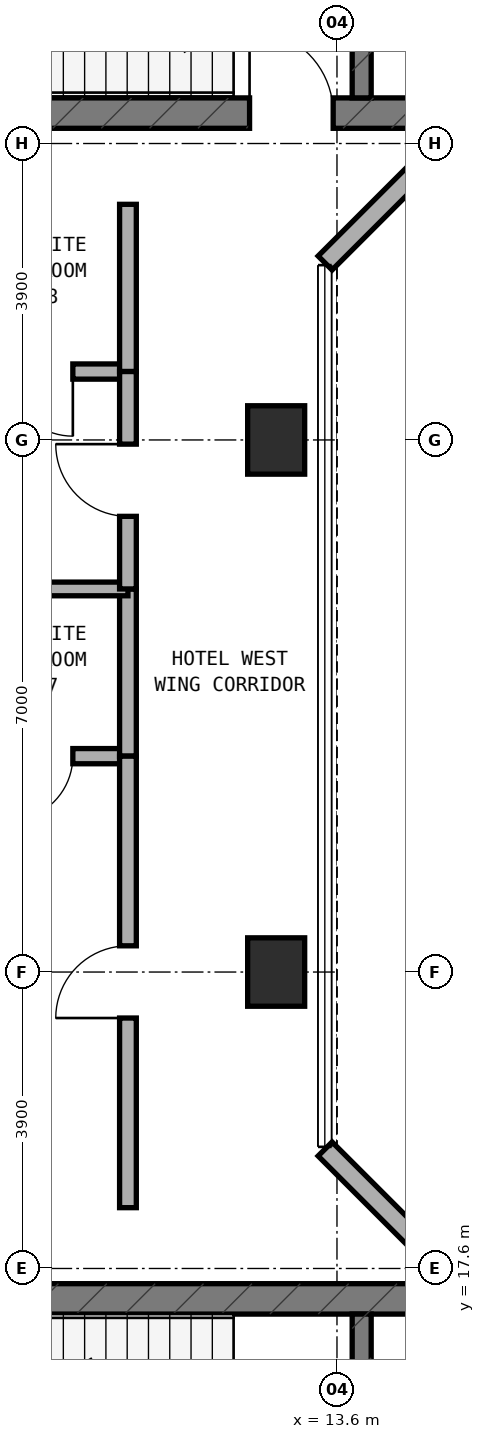
"""IFC4 building model, lengths in metres.
Left out: names, types, materials, properties, quantities, classifications, styles, units other than length and angle.
Written with IfcOpenShell. Run it as: python <this file> out.ifc"""

import sys

from ifc_helpers import new_model, si_unit, direction, frame, frame_2d, origin, origin_2d, place, context, subcontext, project, spatial, rectangle, extrude, element, fill, save


model = new_model("IFC4")
c1 = context("Model", 3, precision=1e-05, world=origin(), true_north=direction((0.0, 1.0)))
c2 = subcontext(c1, "Body", "Model", "MODEL_VIEW")
j1 = project(units=[si_unit("LENGTHUNIT", "METRE"), si_unit("PLANEANGLEUNIT", "RADIAN")], contexts=[c1])
p1 = place(None, origin())
s1 = spatial("IfcSite", under=j1, at=p1, CompositionType="ELEMENT")
p2 = place(p1, origin())
s2 = spatial("IfcBuilding", under=s1, at=p2, CompositionType="ELEMENT")
p3 = place(p2, frame((0.0, 0.0, 145.0)))
s3 = spatial("IfcBuildingStorey", under=s2, at=p3, CompositionType="ELEMENT", Elevation=145.0)
p4 = place(p3, frame((6.4, 32.8, 0.0), z_axis=(0.0, 0.0, 1.0), x_axis=(1.0, 0.0, 0.0)))
e1 = element("IfcWall", 1, at=p4, inside=s3, PredefinedType="SHEAR", context=c2, shape_type="SweptSolid", body=[
    extrude(rectangle(XDim=24.4, YDim=0.4, at=frame_2d((12.2, 0.0))), origin(), (0.0, 0.0, 1.0), 3.5),
])
p5 = place(p4, frame((6.05, 0.0, 0.0)))
e2 = element("IfcOpeningElement", 2, at=p5, cuts=e1, PredefinedType="OPENING", context=c2, shape_type="SweptSolid", body=[
    extrude(rectangle(XDim=1.1, YDim=2.15, at=frame_2d((0.55, 1.075))), frame((0.0, 0.21, 0.0), z_axis=(0.0, -1.0, 0.0), x_axis=(1.0, 0.0, 0.0)), (0.0, 0.0, 1.0), 0.42),
])
p6 = place(p3, frame((13.925, 33.0, 0.0), z_axis=(0.0, 0.0, 1.0), x_axis=(0.0, 1.0, 0.0)))
e3 = element("IfcWall", 3, at=p6, inside=s3, PredefinedType="STANDARD", context=c2, shape_type="SweptSolid", body=[
    extrude(rectangle(XDim=3.16, YDim=0.25, at=frame_2d((1.58, 0.0))), origin(), (0.0, 0.0, 1.0), 3.22),
])
p7 = place(p6, frame((0.98, 0.0, 0.0)))
e4 = element("IfcOpeningElement", 4, at=p7, cuts=e3, PredefinedType="OPENING", context=c2, shape_type="SweptSolid", body=[
    extrude(rectangle(XDim=1.1, YDim=2.15, at=frame_2d((0.55, 1.075))), frame((0.0, 0.135, 0.0), z_axis=(0.0, -1.0, 0.0), x_axis=(1.0, 0.0, 0.0)), (0.0, 0.0, 1.0), 0.27),
])
p8 = place(p3, frame((6.4, 17.2, 0.0), z_axis=(0.0, 0.0, 1.0), x_axis=(1.0, 0.0, 0.0)))
e5 = element("IfcWall", 5, at=p8, inside=s3, PredefinedType="SHEAR", context=c2, shape_type="SweptSolid", body=[
    extrude(rectangle(XDim=24.4, YDim=0.4, at=frame_2d((12.2, 0.0))), origin(), (0.0, 0.0, 1.0), 3.5),
])
p9 = place(p3, frame((13.925, 13.84, 0.0), z_axis=(0.0, 0.0, 1.0), x_axis=(0.0, 1.0, 0.0)))
e6 = element("IfcWall", 6, at=p9, inside=s3, PredefinedType="STANDARD", context=c2, shape_type="SweptSolid", body=[
    extrude(rectangle(XDim=3.16, YDim=0.25, at=frame_2d((1.58, 0.0))), origin(), (0.0, 0.0, 1.0), 3.22),
])
p10 = place(p9, frame((0.98, 0.0, 0.0)))
e7 = element("IfcOpeningElement", 7, at=p10, cuts=e6, PredefinedType="OPENING", context=c2, shape_type="SweptSolid", body=[
    extrude(rectangle(XDim=1.1, YDim=2.15, at=frame_2d((0.55, 1.075))), frame((0.0, 0.135, 0.0), z_axis=(0.0, -1.0, 0.0), x_axis=(1.0, 0.0, 0.0)), (0.0, 0.0, 1.0), 0.27),
])
for number, where, z_axis, x_axis in (
    (8, (12.8, 21.5, 0.0), (0.0, 0.0, 1.0), (1.0, 0.0, 0.0)),
    (9, (12.8, 28.5, 0.0), (0.0, 0.0, 1.0), (1.0, 0.0, 0.0)),
):
    element("IfcColumn", number, at=place(p3, frame(where, z_axis=z_axis, x_axis=x_axis)), inside=s3, PredefinedType="COLUMN", context=c2, shape_type="SweptSolid", body=[
        extrude(rectangle(XDim=0.75, YDim=0.9, at=origin_2d()), origin(), (0.0, 0.0, 1.0), 3.5),
    ])
for number, where, z_axis, x_axis in (
    (10, (15.278, 32.662, 0.0), (0.0, 0.0, 1.0), (-0.707, -0.707, 0.0)),
    (11, (13.444, 19.172, 0.0), (0.0, 0.0, 1.0), (0.707, -0.707, 0.0)),
):
    element("IfcWall", number, at=place(p3, frame(where, z_axis=z_axis, x_axis=x_axis)), inside=s3, PredefinedType="STANDARD", context=c2, shape_type="SweptSolid", body=[
        extrude(rectangle(XDim=2.594, YDim=0.26, at=frame_2d((1.297, 0.0))), origin(), (0.0, 0.0, 1.0), 3.22),
    ])
p11 = place(p3, frame((8.65, 24.34, 0.0), z_axis=(0.0, 0.0, 1.0), x_axis=(1.0, 0.0, 0.0)))
e12 = element("IfcWall", 12, at=p11, inside=s3, PredefinedType="PLUMBINGWALL", context=c2, shape_type="SweptSolid", body=[
    extrude(rectangle(XDim=2.1, YDim=0.2, at=frame_2d((1.05, 0.0))), origin(), (0.0, 0.0, 1.0), 3.22),
])
p12 = place(p11, frame((0.625, 0.0, 0.0)))
e13 = element("IfcOpeningElement", 13, at=p12, cuts=e12, PredefinedType="OPENING", context=c2, shape_type="SweptSolid", body=[
    extrude(rectangle(XDim=0.85, YDim=2.1, at=frame_2d((0.425, 1.05))), frame((0.0, 0.11, 0.0), z_axis=(0.0, -1.0, 0.0), x_axis=(1.0, 0.0, 0.0)), (0.0, 0.0, 1.0), 0.22),
])
p13 = place(p3, frame((10.85, 24.34, 0.0), z_axis=(0.0, 0.0, 1.0), x_axis=(0.0, 1.0, 0.0)))
e14 = element("IfcWall", 14, at=p13, inside=s3, PredefinedType="SOLIDWALL", context=c2, shape_type="SweptSolid", body=[
    extrude(rectangle(XDim=2.2, YDim=0.22, at=frame_2d((1.1, 0.0))), origin(), (0.0, 0.0, 1.0), 3.22),
])
p14 = place(p3, frame((10.85, 18.4, 0.0), z_axis=(0.0, 0.0, 1.0), x_axis=(0.0, 1.0, 0.0)))
e15 = element("IfcWall", 15, at=p14, inside=s3, PredefinedType="SOLIDWALL", context=c2, shape_type="SweptSolid", body=[
    extrude(rectangle(XDim=5.94, YDim=0.22, at=frame_2d((2.97, 0.0))), origin(), (0.0, 0.0, 1.0), 2.795),
])
p15 = place(p14, frame((2.495, 0.0, 0.0)))
e16 = element("IfcOpeningElement", 16, at=p15, cuts=e15, PredefinedType="OPENING", context=c2, shape_type="SweptSolid", body=[
    extrude(rectangle(XDim=0.95, YDim=2.1, at=frame_2d((0.475, 1.05))), frame((0.0, 0.12, 0.0), z_axis=(0.0, -1.0, 0.0), x_axis=(1.0, 0.0, 0.0)), (0.0, 0.0, 1.0), 0.24),
])
p16 = place(p3, frame((0.86, 26.54, 0.0), z_axis=(0.0, 0.0, 1.0), x_axis=(1.0, 0.0, 0.0)))
e17 = element("IfcWall", 17, at=p16, inside=s3, PredefinedType="SOLIDWALL", context=c2, shape_type="SweptSolid", body=[
    extrude(rectangle(XDim=9.99, YDim=0.18, at=frame_2d((4.995, 0.0))), origin(), (0.0, 0.0, 1.0), 2.835),
])
p17 = place(p3, frame((8.65, 29.4, 0.0), z_axis=(0.0, 0.0, 1.0), x_axis=(1.0, 0.0, 0.0)))
e18 = element("IfcWall", 18, at=p17, inside=s3, PredefinedType="PLUMBINGWALL", context=c2, shape_type="SweptSolid", body=[
    extrude(rectangle(XDim=2.1, YDim=0.2, at=frame_2d((1.05, 0.0))), origin(), (0.0, 0.0, 1.0), 3.22),
])
p18 = place(p17, frame((0.625, 0.0, 0.0)))
e19 = element("IfcOpeningElement", 19, at=p18, cuts=e18, PredefinedType="OPENING", context=c2, shape_type="SweptSolid", body=[
    extrude(rectangle(XDim=0.85, YDim=2.1, at=frame_2d((0.425, 1.05))), frame((0.0, 0.11, 0.0), z_axis=(0.0, -1.0, 0.0), x_axis=(1.0, 0.0, 0.0)), (0.0, 0.0, 1.0), 0.22),
])
p19 = place(p3, frame((10.85, 29.4, 0.0), z_axis=(0.0, 0.0, 1.0), x_axis=(0.0, 1.0, 0.0)))
e20 = element("IfcWall", 20, at=p19, inside=s3, PredefinedType="SOLIDWALL", context=c2, shape_type="SweptSolid", body=[
    extrude(rectangle(XDim=2.2, YDim=0.22, at=frame_2d((1.1, 0.0))), origin(), (0.0, 0.0, 1.0), 3.22),
])
p20 = place(p3, frame((10.85, 26.54, 0.0), z_axis=(0.0, 0.0, 1.0), x_axis=(0.0, 1.0, 0.0)))
e21 = element("IfcWall", 21, at=p20, inside=s3, PredefinedType="SOLIDWALL", context=c2, shape_type="SweptSolid", body=[
    extrude(rectangle(XDim=2.86, YDim=0.22, at=frame_2d((1.43, 0.0))), origin(), (0.0, 0.0, 1.0), 2.795),
])
p21 = place(p20, frame((0.955, 0.0, 0.0)))
e22 = element("IfcOpeningElement", 22, at=p21, cuts=e21, PredefinedType="OPENING", context=c2, shape_type="SweptSolid", body=[
    extrude(rectangle(XDim=0.95, YDim=2.1, at=frame_2d((0.475, 1.05))), frame((0.0, 0.12, 0.0), z_axis=(0.0, -1.0, 0.0), x_axis=(1.0, 0.0, 0.0)), (0.0, 0.0, 1.0), 0.24),
])
p22 = place(p5, origin())
e23 = element("IfcDoor", 23, at=p22, inside=s3, OperationType="SINGLE_SWING_LEFT", PredefinedType="DOOR", context=c2, shape_type="SweptSolid", body=[
    extrude(rectangle(XDim=1.1, YDim=2.15, at=frame_2d((0.55, 1.075))), frame((0.0, 0.025, 0.0), z_axis=(0.0, -1.0, 0.0), x_axis=(1.0, 0.0, 0.0)), (0.0, 0.0, 1.0), 0.05),
])
fill(e2, e23)
p23 = place(p12, frame((0.85, 0.0, 0.0), z_axis=(0.0, 0.0, 1.0), x_axis=(-1.0, 0.0, 0.0)))
e24 = element("IfcDoor", 24, at=p23, inside=s3, OperationType="SINGLE_SWING_RIGHT", PredefinedType="DOOR", context=c2, shape_type="SweptSolid", body=[
    extrude(rectangle(XDim=0.85, YDim=2.1, at=frame_2d((0.425, 1.05))), frame((0.0, 0.025, 0.0), z_axis=(0.0, -1.0, 0.0), x_axis=(1.0, 0.0, 0.0)), (0.0, 0.0, 1.0), 0.05),
])
fill(e13, e24)
p24 = place(p15, origin())
e25 = element("IfcDoor", 25, at=p24, inside=s3, OperationType="SINGLE_SWING_LEFT", PredefinedType="DOOR", context=c2, shape_type="SweptSolid", body=[
    extrude(rectangle(XDim=0.95, YDim=2.1, at=frame_2d((0.475, 1.05))), frame((0.0, 0.025, 0.0), z_axis=(0.0, -1.0, 0.0), x_axis=(1.0, 0.0, 0.0)), (0.0, 0.0, 1.0), 0.05),
])
fill(e16, e25)
p25 = place(p18, frame((0.85, 0.0, 0.0), z_axis=(0.0, 0.0, 1.0), x_axis=(-1.0, 0.0, 0.0)))
e26 = element("IfcDoor", 26, at=p25, inside=s3, OperationType="SINGLE_SWING_LEFT", PredefinedType="DOOR", context=c2, shape_type="SweptSolid", body=[
    extrude(rectangle(XDim=0.85, YDim=2.1, at=frame_2d((0.425, 1.05))), frame((0.0, 0.025, 0.0), z_axis=(0.0, -1.0, 0.0), x_axis=(1.0, 0.0, 0.0)), (0.0, 0.0, 1.0), 0.05),
])
fill(e19, e26)
p26 = place(p21, origin())
e27 = element("IfcDoor", 27, at=p26, inside=s3, OperationType="SINGLE_SWING_RIGHT", PredefinedType="DOOR", context=c2, shape_type="SweptSolid", body=[
    extrude(rectangle(XDim=0.95, YDim=2.1, at=frame_2d((0.475, 1.05))), frame((0.0, 0.025, 0.0), z_axis=(0.0, -1.0, 0.0), x_axis=(1.0, 0.0, 0.0)), (0.0, 0.0, 1.0), 0.05),
])
fill(e22, e27)
save(model, sys.argv[1])
